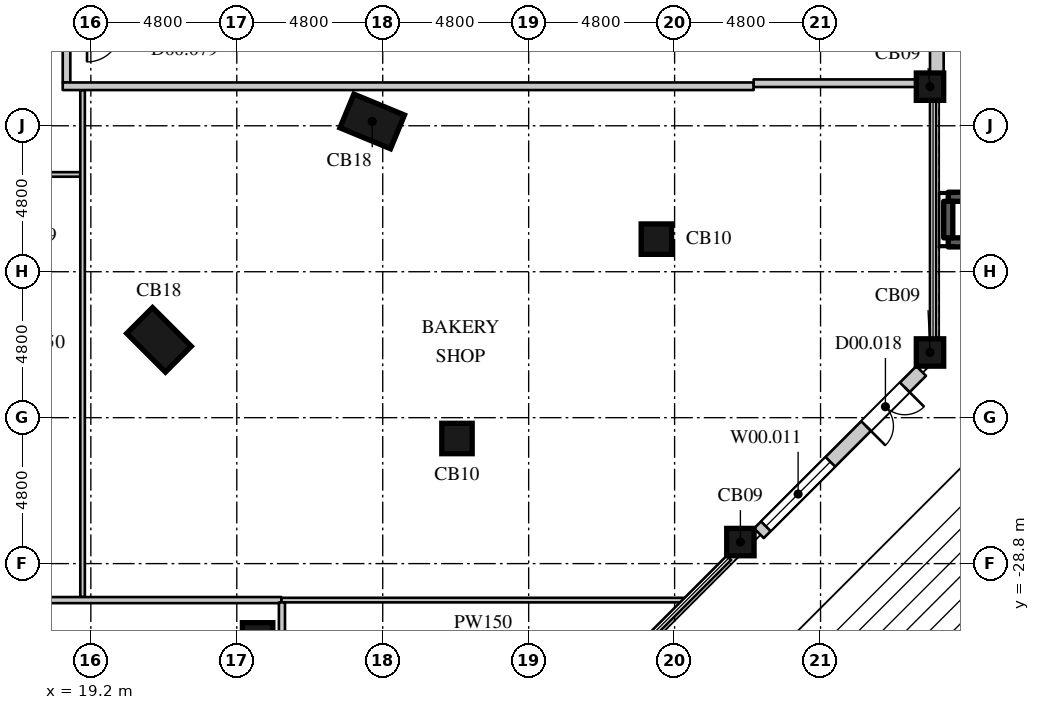
"""IFC4 building model, lengths in metres.
Left out: names, types, materials, properties, quantities, classifications, styles, units other than length and angle.
Written with IfcOpenShell. Run it as: python <this file> out.ifc"""

import sys

from ifc_helpers import new_model, si_unit, direction, frame, frame_2d, origin, origin_2d, place, context, subcontext, project, spatial, rectangle, extrude, element, fill, save


model = new_model("IFC4")
c1 = context("Model", 3, precision=1e-05, world=origin(), true_north=direction((0.0, 1.0)))
c2 = subcontext(c1, "Body", "Model", "MODEL_VIEW")
j1 = project(units=[si_unit("LENGTHUNIT", "METRE"), si_unit("PLANEANGLEUNIT", "RADIAN")], contexts=[c1])
p1 = place(None, origin())
s1 = spatial("IfcSite", under=j1, at=p1, CompositionType="ELEMENT")
p2 = place(p1, origin())
s2 = spatial("IfcBuilding", under=s1, at=p2, CompositionType="ELEMENT")
p3 = place(p2, origin())
s3 = spatial("IfcBuildingStorey", under=s2, at=p3, CompositionType="ELEMENT", Elevation=0.0)
p4 = place(p3, frame((24.685, -31.243, 0.0), z_axis=(0.0, 0.0, 1.0), x_axis=(1.0, 0.0, 0.0)))
e1 = element("IfcColumn", 1, at=p4, inside=s3, PredefinedType="COLUMN", context=c2, shape_type="SweptSolid", body=[
    extrude(rectangle(XDim=1.0, YDim=1.0, at=origin_2d()), origin(), (0.0, 0.0, 1.0), 6.0),
])
p5 = place(p3, frame((40.564, -28.092, 0.0), z_axis=(0.0, 0.0, 1.0), x_axis=(1.0, 0.0, 0.0)))
e2 = element("IfcColumn", 2, at=p5, inside=s3, PredefinedType="COLUMN", context=c2, shape_type="SweptSolid", body=[
    extrude(rectangle(XDim=0.9, YDim=0.9, at=origin_2d()), origin(), (0.0, 0.0, 1.0), 6.0),
])
p6 = place(p3, frame((31.243, -24.685, 0.0), z_axis=(0.0, 0.0, 1.0), x_axis=(1.0, 0.0, 0.0)))
e3 = element("IfcColumn", 3, at=p6, inside=s3, PredefinedType="COLUMN", context=c2, shape_type="SweptSolid", body=[
    extrude(rectangle(XDim=1.0, YDim=1.0, at=origin_2d()), origin(), (0.0, 0.0, 1.0), 6.0),
])
p7 = place(p3, frame((46.8, -21.856, 0.0), z_axis=(0.0, 0.0, 1.0), x_axis=(1.0, 0.0, 0.0)))
e4 = element("IfcColumn", 4, at=p7, inside=s3, PredefinedType="COLUMN", context=c2, shape_type="SweptSolid", body=[
    extrude(rectangle(XDim=0.9, YDim=0.9, at=origin_2d()), origin(), (0.0, 0.0, 1.0), 6.0),
])
p8 = place(p3, frame((21.441, -21.441, 0.0), z_axis=(0.0, 0.0, 1.0), x_axis=(0.707106781187, 0.707106781187, 0.0)))
e5 = element("IfcColumn", 5, at=p8, inside=s3, PredefinedType="COLUMN", context=c2, shape_type="SweptSolid", body=[
    extrude(rectangle(XDim=1.2, YDim=1.8, at=origin_2d()), origin(), (0.0, 0.0, 1.0), 6.0),
])
p9 = place(p3, frame((37.8, -18.128, 0.0), z_axis=(0.0, 0.0, 1.0), x_axis=(1.0, 0.0, 0.0)))
e6 = element("IfcColumn", 6, at=p9, inside=s3, PredefinedType="COLUMN", context=c2, shape_type="SweptSolid", body=[
    extrude(rectangle(XDim=1.0, YDim=1.0, at=origin_2d()), origin(), (0.0, 0.0, 1.0), 6.0),
])
p10 = place(p3, frame((28.454, -14.257, 0.0), z_axis=(0.0, 0.0, 1.0), x_axis=(0.382683496864, 0.923879505795, 0.0)))
e7 = element("IfcColumn", 7, at=p10, inside=s3, PredefinedType="COLUMN", context=c2, shape_type="SweptSolid", body=[
    extrude(rectangle(XDim=1.2, YDim=1.8, at=origin_2d()), origin(), (0.0, 0.0, 1.0), 6.0),
])
p11 = place(p3, frame((46.8, -13.114, 0.0), z_axis=(0.0, 0.0, 1.0), x_axis=(1.0, 0.0, 0.0)))
e8 = element("IfcColumn", 8, at=p11, inside=s3, PredefinedType="COLUMN", context=c2, shape_type="SweptSolid", body=[
    extrude(rectangle(XDim=0.9, YDim=0.9, at=origin_2d()), origin(), (0.0, 0.0, 1.0), 6.0),
])
p12 = place(p3, frame((47.025, -12.664, 0.0), z_axis=(0.0, 0.0, 1.0), x_axis=(0.0, 1.0, 0.0)))
e9 = element("IfcWall", 9, at=p12, inside=s3, PredefinedType="ELEMENTEDWALL", context=c2, shape_type="SweptSolid", body=[
    extrude(rectangle(XDim=7.842, YDim=0.45, at=frame_2d((3.921, 0.0))), origin(), (0.0, 0.0, 1.0), 4.8),
])
p13 = place(p12, frame((1.01, 0.0, 0.0)))
e10 = element("IfcOpeningElement", 10, at=p13, cuts=e9, PredefinedType="OPENING", context=c2, shape_type="SweptSolid", body=[
    extrude(rectangle(XDim=1.9, YDim=2.7, at=frame_2d((0.95, 1.35))), frame((0.0, 0.235, 0.0), z_axis=(0.0, -1.0, 0.0), x_axis=(1.0, 0.0, 0.0)), (0.0, 0.0, 1.0), 0.47),
])
p14 = place(p12, frame((5.207, 0.0, 0.0)))
e11 = element("IfcOpeningElement", 11, at=p14, cuts=e9, PredefinedType="OPENING", context=c2, shape_type="SweptSolid", body=[
    extrude(rectangle(XDim=1.8, YDim=2.7, at=frame_2d((0.9, 1.35))), frame((0.0, 0.235, 0.0), z_axis=(0.0, -1.0, 0.0), x_axis=(1.0, 0.0, 0.0)), (0.0, 0.0, 1.0), 0.47),
])
p15 = place(p3, frame((41.173, -27.801, 0.0), z_axis=(0.0, 0.0, 1.0), x_axis=(0.70709060488, 0.707122957123, 0.0)))
e12 = element("IfcWall", 12, at=p15, inside=s3, PredefinedType="ELEMENTEDWALL", context=c2, shape_type="SweptSolid", body=[
    extrude(rectangle(XDim=7.546, YDim=0.45, at=frame_2d((3.773, 0.0))), origin(), (0.0, 0.0, 1.0), 4.8),
])
p16 = place(p15, frame((0.323, 0.0, 1.05)))
e13 = element("IfcOpeningElement", 13, at=p16, cuts=e12, PredefinedType="OPENING", context=c2, shape_type="SweptSolid", body=[
    extrude(rectangle(XDim=3.0, YDim=2.7, at=frame_2d((1.5, 1.35))), frame((0.0, 0.235, 0.0), z_axis=(0.0, -1.0, 0.0), x_axis=(1.0, 0.0, 0.0)), (0.0, 0.0, 1.0), 0.47),
])
p17 = place(p15, frame((4.985, 0.0, 0.0)))
e14 = element("IfcOpeningElement", 14, at=p17, cuts=e12, PredefinedType="OPENING", context=c2, shape_type="SweptSolid", body=[
    extrude(rectangle(XDim=1.8, YDim=2.7, at=frame_2d((0.9, 1.35))), frame((0.0, 0.235, 0.0), z_axis=(0.0, -1.0, 0.0), x_axis=(1.0, 0.0, 0.0)), (0.0, 0.0, 1.0), 0.47),
])
p18 = place(p3, frame((11.125, -16.0, 0.0), z_axis=(0.0, 0.0, 1.0), x_axis=(1.0, 0.0, 0.0)))
e15 = element("IfcWall", 15, at=p18, inside=s3, PredefinedType="PARTITIONING", context=c2, shape_type="SweptSolid", body=[
    extrude(rectangle(XDim=7.728, YDim=0.15, at=frame_2d((3.864, 0.0))), origin(), (0.0, 0.0, 1.0), 5.65),
])
p19 = place(p3, frame((18.928, -29.9, 0.0), z_axis=(0.0, 0.0, 1.0), x_axis=(0.0, 1.0, 0.0)))
e16 = element("IfcWall", 16, at=p19, inside=s3, PredefinedType="PARTITIONING", context=c2, shape_type="SweptSolid", body=[
    extrude(rectangle(XDim=16.675, YDim=0.15, at=frame_2d((8.337, 0.0))), origin(), (0.0, 0.0, 1.0), 5.65),
])
p20 = place(p3, frame((25.465, -30.0, 0.0), z_axis=(0.0, 0.0, 1.0), x_axis=(1.0, 0.0, 0.0)))
e17 = element("IfcWall", 17, at=p20, inside=s3, PredefinedType="PARTITIONING", context=c2, shape_type="SweptSolid", body=[
    extrude(rectangle(XDim=13.268, YDim=0.15, at=frame_2d((6.634, 0.0))), origin(), (0.0, 0.0, 1.0), 5.65),
])
p21 = place(p3, frame((13.225, -30.0, 0.0), z_axis=(0.0, 0.0, 1.0), x_axis=(1.0, 0.0, 0.0)))
e18 = element("IfcWall", 18, at=p21, inside=s3, PredefinedType="PARTITIONING", context=c2, shape_type="SweptSolid", body=[
    extrude(rectangle(XDim=12.24, YDim=0.2, at=frame_2d((6.12, 0.0))), origin(), (0.0, 0.0, 1.0), 5.65),
])
p22 = place(p3, frame((25.485, -43.248, 0.0), z_axis=(0.0, 0.0, 1.0), x_axis=(0.0, 1.0, 0.0)))
e19 = element("IfcWall", 19, at=p22, inside=s3, PredefinedType="PARTITIONING", context=c2, shape_type="SweptSolid", body=[
    extrude(rectangle(XDim=13.173, YDim=0.2, at=frame_2d((6.587, 0.0))), origin(), (0.0, 0.0, 1.0), 5.65),
])
p23 = place(p3, frame((18.4, -12.975, 0.0), z_axis=(0.0, 0.0, 1.0), x_axis=(0.0, 1.0, 0.0)))
e20 = element("IfcWall", 20, at=p23, inside=s3, PredefinedType="PARTITIONING", context=c2, shape_type="SweptSolid", body=[
    extrude(rectangle(XDim=1.775, YDim=0.25, at=frame_2d((0.888, 0.0))), origin(), (0.0, 0.0, 1.0), 5.65),
])
p24 = place(p3, frame((18.275, -13.1, 0.0), z_axis=(0.0, 0.0, 1.0), x_axis=(1.0, 0.0, 0.0)))
e21 = element("IfcWall", 21, at=p24, inside=s3, PredefinedType="PARTITIONING", context=c2, shape_type="SweptSolid", body=[
    extrude(rectangle(XDim=22.725, YDim=0.25, at=frame_2d((11.363, 0.0))), origin(), (0.0, 0.0, 1.0), 5.65),
])
p25 = place(p3, frame((41.0, -13.0, 0.0), z_axis=(0.0, 0.0, 1.0), x_axis=(1.0, 0.0, 0.0)))
e22 = element("IfcWall", 22, at=p25, inside=s3, PredefinedType="PARTITIONING", context=c2, shape_type="SweptSolid", body=[
    extrude(rectangle(XDim=5.35, YDim=0.25, at=frame_2d((2.675, 0.0))), origin(), (0.0, 0.0, 1.0), 5.65),
])
for number, where, z_axis, x_axis in (
    (23, (47.4, -18.235, 0.0), (0.0, 0.0, 1.0), (1.0, 0.0, 0.0)),
    (24, (47.4, -16.735, 0.0), (0.0, 0.0, 1.0), (1.0, 0.0, 0.0)),
):
    element("IfcWall", number, at=place(p3, frame(where, z_axis=z_axis, x_axis=x_axis)), inside=s3, PredefinedType="SOLIDWALL", context=c2, shape_type="SweptSolid", body=[
        extrude(rectangle(XDim=1.35, YDim=0.3, at=frame_2d((0.675, 0.0))), origin(), (0.0, 0.0, 1.0), 5.8),
    ])
p26 = place(p3, frame((47.4, -18.085, 0.0), z_axis=(0.0, 0.0, 1.0), x_axis=(0.0, 1.0, 0.0)))
e25 = element("IfcWall", 25, at=p26, inside=s3, PredefinedType="SOLIDWALL", context=c2, shape_type="SweptSolid", body=[
    extrude(rectangle(XDim=1.2, YDim=0.3, at=frame_2d((0.6, 0.0))), origin(), (0.0, 0.0, 1.0), 5.8),
])
p27 = place(p16, origin())
e26 = element("IfcWindow", 26, at=p27, inside=s3, PartitioningType="SINGLE_PANEL", PredefinedType="WINDOW", context=c2, shape_type="SweptSolid", body=[
    extrude(rectangle(XDim=3.0, YDim=2.7, at=frame_2d((1.5, 1.35))), frame((0.0, 0.135, 0.0), z_axis=(0.0, -1.0, 0.0), x_axis=(1.0, 0.0, 0.0)), (0.0, 0.0, 1.0), 0.06),
])
fill(e13, e26)
p28 = place(p17, frame((1.8, 0.0, 0.0), z_axis=(0.0, 0.0, 1.0), x_axis=(-1.0, 0.0, 0.0)))
e27 = element("IfcDoor", 27, at=p28, inside=s3, OperationType="DOUBLE_DOOR_SINGLE_SWING", PredefinedType="DOOR", context=c2, shape_type="SweptSolid", body=[
    extrude(rectangle(XDim=1.8, YDim=2.7, at=frame_2d((0.9, 1.35))), frame((0.0, -0.08, 0.0), z_axis=(0.0, -1.0, 0.0), x_axis=(1.0, 0.0, 0.0)), (0.0, 0.0, 1.0), 0.05),
])
fill(e14, e27)
save(model, sys.argv[1])
